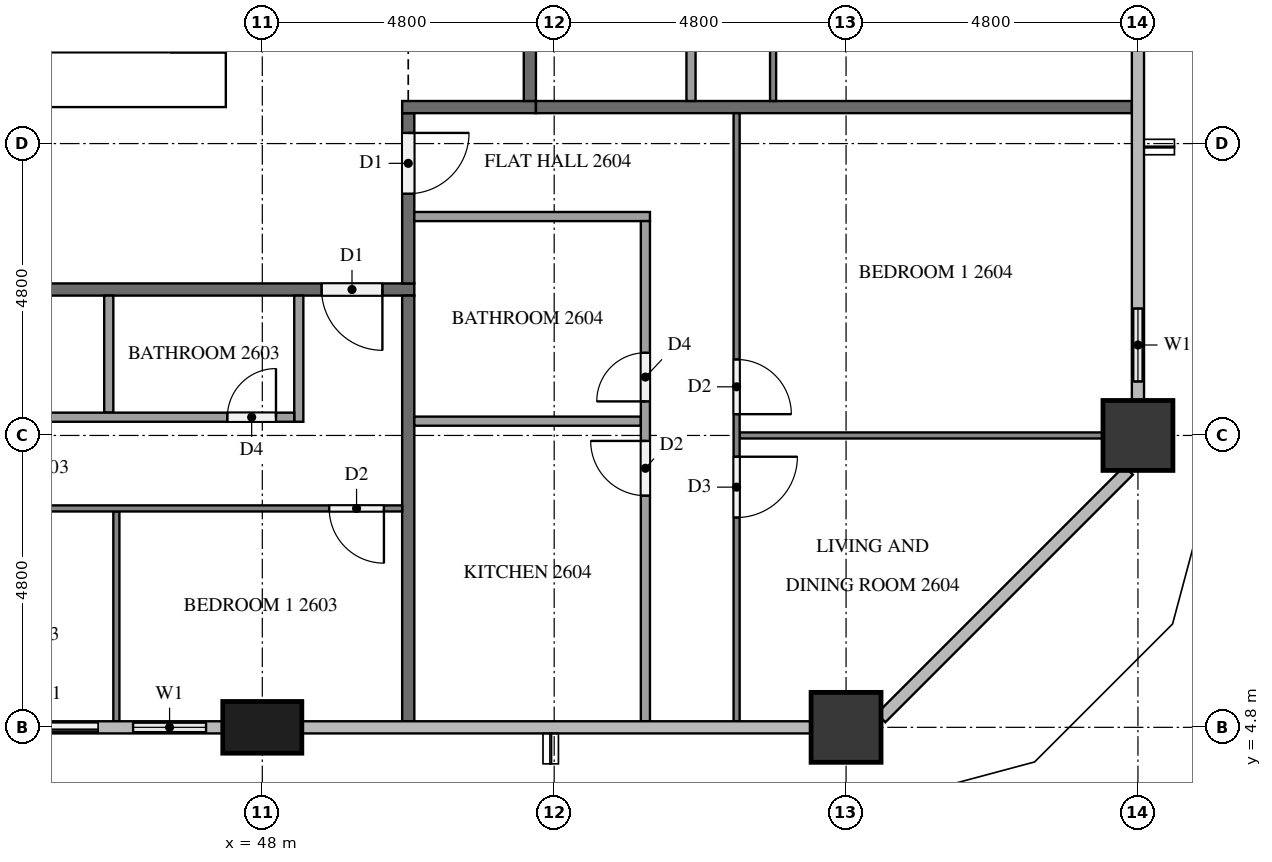
"""IFC4 building model, lengths in metres.
Left out: names, types, materials, properties, quantities, classifications, styles, units other than length and angle.
Written with IfcOpenShell. Run it as: python <this file> out.ifc"""

import sys

from ifc_helpers import new_model, si_unit, direction, frame, frame_2d, origin, origin_2d, place, context, subcontext, project, spatial, rectangle, extrude, element, fill, save


model = new_model("IFC4")
c1 = context("Model", 3, precision=1e-05, world=origin(), true_north=direction((0.0, 1.0)))
c2 = subcontext(c1, "Body", "Model", "MODEL_VIEW")
j1 = project(units=[si_unit("LENGTHUNIT", "METRE"), si_unit("PLANEANGLEUNIT", "RADIAN")], contexts=[c1])
p1 = place(None, origin())
s1 = spatial("IfcSite", under=j1, at=p1, CompositionType="ELEMENT")
p2 = place(p1, origin())
s2 = spatial("IfcBuilding", under=s1, at=p2, CompositionType="ELEMENT")
p3 = place(p2, frame((0.0, 0.0, 103.2)))
s3 = spatial("IfcBuildingStorey", under=s2, at=p3, CompositionType="ELEMENT", Elevation=103.2)
p4 = place(p3, frame((15.0, 15.45, 0.0), z_axis=(0.0, 0.0, 1.0), x_axis=(1.0, 0.0, 0.0)))
e1 = element("IfcWall", 1, at=p4, inside=s3, PredefinedType="SHEAR", context=c2, shape_type="SweptSolid", body=[
    extrude(rectangle(XDim=32.4, YDim=0.9, at=frame_2d((16.2, 0.0))), origin(), (0.0, 0.0, 1.0), 3.2),
])
p5 = place(p4, frame((15.3, 0.0, 0.0)))
e2 = element("IfcOpeningElement", 2, at=p5, cuts=e1, PredefinedType="OPENING", context=c2, shape_type="SweptSolid", body=[
    extrude(rectangle(XDim=1.8, YDim=2.1, at=frame_2d((0.9, 1.05))), frame((0.0, 0.46, 0.0), z_axis=(0.0, -1.0, 0.0), x_axis=(1.0, 0.0, 0.0)), (0.0, 0.0, 1.0), 0.92),
])
p6 = place(p3, frame((48.0, 4.8, 0.0), z_axis=(0.0, 0.0, 1.0), x_axis=(1.0, 0.0, 0.0)))
e3 = element("IfcColumn", 3, at=p6, inside=s3, PredefinedType="COLUMN", context=c2, shape_type="SweptSolid", body=[
    extrude(rectangle(XDim=1.3, YDim=0.85, at=origin_2d()), origin(), (0.0, 0.0, 1.0), 3.2),
])
for number, where, z_axis, x_axis in (
    (4, (57.6, 4.8, 0.0), (0.0, 0.0, 1.0), (1.0, 0.0, 0.0)),
    (5, (62.4, 9.6, 0.0), (0.0, 0.0, 1.0), (1.0, 0.0, 0.0)),
):
    element("IfcColumn", number, at=place(p3, frame(where, z_axis=z_axis, x_axis=x_axis)), inside=s3, PredefinedType="COLUMN", context=c2, shape_type="SweptSolid", body=[
        extrude(rectangle(XDim=1.15, YDim=1.15, at=origin_2d()), origin(), (0.0, 0.0, 1.0), 3.2),
    ])
p7 = place(p3, frame((43.2, 4.8, 0.0), z_axis=(0.0, 0.0, 1.0), x_axis=(1.0, 0.0, 0.0)))
e6 = element("IfcWall", 6, at=p7, inside=s3, PredefinedType="SOLIDWALL", context=c2, shape_type="SweptSolid", body=[
    extrude(rectangle(XDim=4.15, YDim=0.15, at=frame_2d((2.075, 0.0))), origin(), (0.0, 0.0, 1.0), 3.2),
])
p8 = place(p7, frame((0.3, 0.0, 0.0)))
e7 = element("IfcOpeningElement", 7, at=p8, cuts=e6, PredefinedType="OPENING", context=c2, shape_type="SweptSolid", body=[
    extrude(rectangle(XDim=1.8, YDim=2.4, at=frame_2d((0.9, 1.2))), frame((0.0, 0.085, 0.0), z_axis=(0.0, -1.0, 0.0), x_axis=(1.0, 0.0, 0.0)), (0.0, 0.0, 1.0), 0.17),
])
p9 = place(p7, frame((2.675, 0.0, 0.9)))
e8 = element("IfcOpeningElement", 8, at=p9, cuts=e6, PredefinedType="OPENING", context=c2, shape_type="SweptSolid", body=[
    extrude(rectangle(XDim=1.2, YDim=1.4, at=frame_2d((0.6, 0.7))), frame((0.0, 0.085, 0.0), z_axis=(0.0, -1.0, 0.0), x_axis=(1.0, 0.0, 0.0)), (0.0, 0.0, 1.0), 0.17),
])
p10 = place(p3, frame((62.4, 10.175, 0.0), z_axis=(0.0, 0.0, 1.0), x_axis=(0.0, 1.0, 0.0)))
e9 = element("IfcWall", 9, at=p10, inside=s3, PredefinedType="SOLIDWALL", context=c2, shape_type="SweptSolid", body=[
    extrude(rectangle(XDim=1.825, YDim=0.15, at=frame_2d((0.913, 0.0))), origin(), (0.0, 0.0, 1.0), 3.2),
])
p11 = place(p10, frame((0.312, 0.0, 0.9)))
e10 = element("IfcOpeningElement", 10, at=p11, cuts=e9, PredefinedType="OPENING", context=c2, shape_type="SweptSolid", body=[
    extrude(rectangle(XDim=1.2, YDim=1.4, at=frame_2d((0.6, 0.7))), frame((0.0, 0.085, 0.0), z_axis=(0.0, -1.0, 0.0), x_axis=(1.0, 0.0, 0.0)), (0.0, 0.0, 1.0), 0.17),
])
p12 = place(p3, frame((50.5, 12.0, 0.0), z_axis=(0.0, 0.0, 1.0), x_axis=(-1.0, 0.0, 0.0)))
e11 = element("IfcWall", 11, at=p12, inside=s3, PredefinedType="PARTITIONING", context=c2, shape_type="SweptSolid", body=[
    extrude(rectangle(XDim=38.6, YDim=0.2, at=frame_2d((19.3, 0.0))), origin(), (0.0, 0.0, 1.0), 3.2),
])
p13 = place(p12, frame((37.075, 0.0, 0.0)))
e12 = element("IfcOpeningElement", 12, at=p13, cuts=e11, PredefinedType="OPENING", context=c2, shape_type="SweptSolid", body=[
    extrude(rectangle(XDim=1.0, YDim=2.1, at=frame_2d((0.5, 1.05))), frame((0.0, 0.11, 0.0), z_axis=(0.0, -1.0, 0.0), x_axis=(1.0, 0.0, 0.0)), (0.0, 0.0, 1.0), 0.22),
])
p14 = place(p12, frame((22.675, 0.0, 0.0)))
e13 = element("IfcOpeningElement", 13, at=p14, cuts=e11, PredefinedType="OPENING", context=c2, shape_type="SweptSolid", body=[
    extrude(rectangle(XDim=1.0, YDim=2.1, at=frame_2d((0.5, 1.05))), frame((0.0, 0.11, 0.0), z_axis=(0.0, -1.0, 0.0), x_axis=(1.0, 0.0, 0.0)), (0.0, 0.0, 1.0), 0.22),
])
p15 = place(p12, frame((0.525, 0.0, 0.0)))
e14 = element("IfcOpeningElement", 14, at=p15, cuts=e11, PredefinedType="OPENING", context=c2, shape_type="SweptSolid", body=[
    extrude(rectangle(XDim=1.0, YDim=2.1, at=frame_2d((0.5, 1.05))), frame((0.0, 0.11, 0.0), z_axis=(0.0, -1.0, 0.0), x_axis=(1.0, 0.0, 0.0)), (0.0, 0.0, 1.0), 0.22),
])
p16 = place(p3, frame((50.4, 14.9, 0.0), z_axis=(0.0, 0.0, 1.0), x_axis=(0.0, -1.0, 0.0)))
e15 = element("IfcWall", 15, at=p16, inside=s3, PredefinedType="PARTITIONING", context=c2, shape_type="SweptSolid", body=[
    extrude(rectangle(XDim=2.8, YDim=0.2, at=frame_2d((1.4, 0.0))), origin(), (0.0, 0.0, 1.0), 3.2),
])
p17 = place(p16, frame((0.325, 0.0, 0.0)))
e16 = element("IfcOpeningElement", 16, at=p17, cuts=e15, PredefinedType="OPENING", context=c2, shape_type="SweptSolid", body=[
    extrude(rectangle(XDim=1.0, YDim=2.1, at=frame_2d((0.5, 1.05))), frame((0.0, 0.11, 0.0), z_axis=(0.0, -1.0, 0.0), x_axis=(1.0, 0.0, 0.0)), (0.0, 0.0, 1.0), 0.22),
])
p18 = place(p3, frame((50.3, 15.0, 0.0), z_axis=(0.0, 0.0, 1.0), x_axis=(1.0, 0.0, 0.0)))
e17 = element("IfcWall", 17, at=p18, inside=s3, PredefinedType="PARTITIONING", context=c2, shape_type="SweptSolid", body=[
    extrude(rectangle(XDim=2.2, YDim=0.2, at=frame_2d((1.1, 0.0))), origin(), (0.0, 0.0, 1.0), 3.2),
])
p19 = place(p3, frame((52.4, 37.7, 0.0), z_axis=(0.0, 0.0, 1.0), x_axis=(0.0, -1.0, 0.0)))
e18 = element("IfcWall", 18, at=p19, inside=s3, PredefinedType="PARTITIONING", context=c2, shape_type="SweptSolid", body=[
    extrude(rectangle(XDim=22.6, YDim=0.2, at=frame_2d((11.3, 0.0))), origin(), (0.0, 0.0, 1.0), 3.2),
])
p20 = place(p19, frame((6.925, 0.0, 0.0)))
e19 = element("IfcOpeningElement", 19, at=p20, cuts=e18, PredefinedType="OPENING", context=c2, shape_type="SweptSolid", body=[
    extrude(rectangle(XDim=1.0, YDim=2.1, at=frame_2d((0.5, 1.05))), frame((0.0, 0.11, 0.0), z_axis=(0.0, -1.0, 0.0), x_axis=(1.0, 0.0, 0.0)), (0.0, 0.0, 1.0), 0.22),
])
p21 = place(p19, frame((5.075, 0.0, 0.0)))
e20 = element("IfcOpeningElement", 20, at=p21, cuts=e18, PredefinedType="OPENING", context=c2, shape_type="SweptSolid", body=[
    extrude(rectangle(XDim=1.0, YDim=2.1, at=frame_2d((0.5, 1.05))), frame((0.0, 0.11, 0.0), z_axis=(0.0, -1.0, 0.0), x_axis=(1.0, 0.0, 0.0)), (0.0, 0.0, 1.0), 0.22),
])
p22 = place(p3, frame((50.4, 11.9, 0.0), z_axis=(0.0, 0.0, 1.0), x_axis=(0.0, -1.0, 0.0)))
e21 = element("IfcWall", 21, at=p22, inside=s3, PredefinedType="PARTITIONING", context=c2, shape_type="SweptSolid", body=[
    extrude(rectangle(XDim=7.0, YDim=0.2, at=frame_2d((3.5, 0.0))), origin(), (0.0, 0.0, 1.0), 3.2),
])
p23 = place(p3, frame((52.5, 15.0, 0.0), z_axis=(0.0, 0.0, 1.0), x_axis=(1.0, 0.0, 0.0)))
e22 = element("IfcWall", 22, at=p23, inside=s3, PredefinedType="PARTITIONING", context=c2, shape_type="SweptSolid", body=[
    extrude(rectangle(XDim=9.8, YDim=0.2, at=frame_2d((4.9, 0.0))), origin(), (0.0, 0.0, 1.0), 3.2),
])
p24 = place(p3, frame((45.6, 8.35, 0.0), z_axis=(0.0, 0.0, 1.0), x_axis=(0.0, -1.0, 0.0)))
e23 = element("IfcWall", 23, at=p24, inside=s3, PredefinedType="PARTITIONING", context=c2, shape_type="SweptSolid", body=[
    extrude(rectangle(XDim=3.45, YDim=0.1, at=frame_2d((1.725, 0.0))), origin(), (0.0, 0.0, 1.0), 3.2),
])
p25 = place(p3, frame((50.3, 8.4, 0.0), z_axis=(0.0, 0.0, 1.0), x_axis=(-1.0, 0.0, 0.0)))
e24 = element("IfcWall", 24, at=p25, inside=s3, PredefinedType="PARTITIONING", context=c2, shape_type="SweptSolid", body=[
    extrude(rectangle(XDim=9.4, YDim=0.1, at=frame_2d((4.7, 0.0))), origin(), (0.0, 0.0, 1.0), 3.2),
])
p26 = place(p25, frame((0.3, 0.0, 0.0)))
e25 = element("IfcOpeningElement", 25, at=p26, cuts=e24, PredefinedType="OPENING", context=c2, shape_type="SweptSolid", body=[
    extrude(rectangle(XDim=0.9, YDim=2.1, at=frame_2d((0.45, 1.05))), frame((0.0, 0.06, 0.0), z_axis=(0.0, -1.0, 0.0), x_axis=(1.0, 0.0, 0.0)), (0.0, 0.0, 1.0), 0.12),
])
p27 = place(p25, frame((8.1, 0.0, 0.0)))
e26 = element("IfcOpeningElement", 26, at=p27, cuts=e24, PredefinedType="OPENING", context=c2, shape_type="SweptSolid", body=[
    extrude(rectangle(XDim=1.0, YDim=2.1, at=frame_2d((0.5, 1.05))), frame((0.0, 0.06, 0.0), z_axis=(0.0, -1.0, 0.0), x_axis=(1.0, 0.0, 0.0)), (0.0, 0.0, 1.0), 0.12),
])
p28 = place(p3, frame((45.475, 11.9, 0.0), z_axis=(0.0, 0.0, 1.0), x_axis=(0.0, -1.0, 0.0)))
e27 = element("IfcWall", 27, at=p28, inside=s3, PredefinedType="PARTITIONING", context=c2, shape_type="SweptSolid", body=[
    extrude(rectangle(XDim=1.925, YDim=0.15, at=frame_2d((0.962, 0.0))), origin(), (0.0, 0.0, 1.0), 3.2),
])
p29 = place(p3, frame((48.6, 11.9, 0.0), z_axis=(0.0, 0.0, 1.0), x_axis=(0.0, -1.0, 0.0)))
e28 = element("IfcWall", 28, at=p29, inside=s3, PredefinedType="PARTITIONING", context=c2, shape_type="SweptSolid", body=[
    extrude(rectangle(XDim=2.075, YDim=0.15, at=frame_2d((1.038, 0.0))), origin(), (0.0, 0.0, 1.0), 3.2),
])
p30 = place(p3, frame((40.9, 9.9, 0.0), z_axis=(0.0, 0.0, 1.0), x_axis=(1.0, 0.0, 0.0)))
e29 = element("IfcWall", 29, at=p30, inside=s3, PredefinedType="PARTITIONING", context=c2, shape_type="SweptSolid", body=[
    extrude(rectangle(XDim=7.625, YDim=0.15, at=frame_2d((3.812, 0.0))), origin(), (0.0, 0.0, 1.0), 3.2),
])
p31 = place(p30, frame((6.525, 0.0, 0.0)))
e30 = element("IfcOpeningElement", 30, at=p31, cuts=e29, PredefinedType="OPENING", context=c2, shape_type="SweptSolid", body=[
    extrude(rectangle(XDim=0.8, YDim=2.1, at=frame_2d((0.4, 1.05))), frame((0.0, 0.085, 0.0), z_axis=(0.0, -1.0, 0.0), x_axis=(1.0, 0.0, 0.0)), (0.0, 0.0, 1.0), 0.17),
])
p32 = place(p30, frame((0.35, 0.0, 0.0)))
e31 = element("IfcOpeningElement", 31, at=p32, cuts=e29, PredefinedType="OPENING", context=c2, shape_type="SweptSolid", body=[
    extrude(rectangle(XDim=0.9, YDim=2.1, at=frame_2d((0.45, 1.05))), frame((0.0, 0.085, 0.0), z_axis=(0.0, -1.0, 0.0), x_axis=(1.0, 0.0, 0.0)), (0.0, 0.0, 1.0), 0.17),
])
p33 = place(p3, frame((55.85, 9.6, 0.0), z_axis=(0.0, 0.0, 1.0), x_axis=(1.0, 0.0, 0.0)))
e32 = element("IfcWall", 32, at=p33, inside=s3, PredefinedType="PARTITIONING", context=c2, shape_type="SweptSolid", body=[
    extrude(rectangle(XDim=5.975, YDim=0.1, at=frame_2d((2.987, 0.0))), origin(), (0.0, 0.0, 1.0), 3.2),
])
p34 = place(p3, frame((55.8, 14.9, 0.0), z_axis=(0.0, 0.0, 1.0), x_axis=(0.0, -1.0, 0.0)))
e33 = element("IfcWall", 33, at=p34, inside=s3, PredefinedType="PARTITIONING", context=c2, shape_type="SweptSolid", body=[
    extrude(rectangle(XDim=10.0, YDim=0.1, at=frame_2d((5.0, 0.0))), origin(), (0.0, 0.0, 1.0), 3.2),
])
p35 = place(p34, frame((4.05, 0.0, 0.0)))
e34 = element("IfcOpeningElement", 34, at=p35, cuts=e33, PredefinedType="OPENING", context=c2, shape_type="SweptSolid", body=[
    extrude(rectangle(XDim=0.9, YDim=2.1, at=frame_2d((0.45, 1.05))), frame((0.0, 0.06, 0.0), z_axis=(0.0, -1.0, 0.0), x_axis=(1.0, 0.0, 0.0)), (0.0, 0.0, 1.0), 0.12),
])
p36 = place(p34, frame((5.65, 0.0, 0.0)))
e35 = element("IfcOpeningElement", 35, at=p36, cuts=e33, PredefinedType="OPENING", context=c2, shape_type="SweptSolid", body=[
    extrude(rectangle(XDim=1.0, YDim=2.1, at=frame_2d((0.5, 1.05))), frame((0.0, 0.06, 0.0), z_axis=(0.0, -1.0, 0.0), x_axis=(1.0, 0.0, 0.0)), (0.0, 0.0, 1.0), 0.12),
])
p37 = place(p3, frame((50.5, 9.835, 0.0), z_axis=(0.0, 0.0, 1.0), x_axis=(1.0, 0.0, 0.0)))
e36 = element("IfcWall", 36, at=p37, inside=s3, PredefinedType="PARTITIONING", context=c2, shape_type="SweptSolid", body=[
    extrude(rectangle(XDim=3.725, YDim=0.15, at=frame_2d((1.863, 0.0))), origin(), (0.0, 0.0, 1.0), 3.2),
])
p38 = place(p3, frame((50.5, 13.2, 0.0), z_axis=(0.0, 0.0, 1.0), x_axis=(1.0, 0.0, 0.0)))
e37 = element("IfcWall", 37, at=p38, inside=s3, PredefinedType="PARTITIONING", context=c2, shape_type="SweptSolid", body=[
    extrude(rectangle(XDim=3.875, YDim=0.15, at=frame_2d((1.938, 0.0))), origin(), (0.0, 0.0, 1.0), 3.2),
])
p39 = place(p3, frame((54.3, 4.9, 0.0), z_axis=(0.0, 0.0, 1.0), x_axis=(0.0, 1.0, 0.0)))
e38 = element("IfcWall", 38, at=p39, inside=s3, PredefinedType="PARTITIONING", context=c2, shape_type="SweptSolid", body=[
    extrude(rectangle(XDim=8.225, YDim=0.15, at=frame_2d((4.113, 0.0))), origin(), (0.0, 0.0, 1.0), 3.2),
])
p40 = place(p39, frame((5.26, 0.0, 0.0)))
e39 = element("IfcOpeningElement", 39, at=p40, cuts=e38, PredefinedType="OPENING", context=c2, shape_type="SweptSolid", body=[
    extrude(rectangle(XDim=0.8, YDim=2.1, at=frame_2d((0.4, 1.05))), frame((0.0, 0.085, 0.0), z_axis=(0.0, -1.0, 0.0), x_axis=(1.0, 0.0, 0.0)), (0.0, 0.0, 1.0), 0.17),
])
p41 = place(p39, frame((3.71, 0.0, 0.0)))
e40 = element("IfcOpeningElement", 40, at=p41, cuts=e38, PredefinedType="OPENING", context=c2, shape_type="SweptSolid", body=[
    extrude(rectangle(XDim=0.9, YDim=2.1, at=frame_2d((0.45, 1.05))), frame((0.0, 0.085, 0.0), z_axis=(0.0, -1.0, 0.0), x_axis=(1.0, 0.0, 0.0)), (0.0, 0.0, 1.0), 0.17),
])
p42 = place(p3, frame((56.4, 31.1, 0.0), z_axis=(0.0, 0.0, 1.0), x_axis=(0.0, -1.0, 0.0)))
e41 = element("IfcWall", 41, at=p42, inside=s3, PredefinedType="PARTITIONING", context=c2, shape_type="SweptSolid", body=[
    extrude(rectangle(XDim=16.0, YDim=0.1, at=frame_2d((8.0, 0.0))), origin(), (0.0, 0.0, 1.0), 3.2),
])
p43 = place(p42, frame((0.3, 0.0, 0.0)))
e42 = element("IfcOpeningElement", 42, at=p43, cuts=e41, PredefinedType="OPENING", context=c2, shape_type="SweptSolid", body=[
    extrude(rectangle(XDim=0.9, YDim=2.1, at=frame_2d((0.45, 1.05))), frame((0.0, 0.06, 0.0), z_axis=(0.0, -1.0, 0.0), x_axis=(1.0, 0.0, 0.0)), (0.0, 0.0, 1.0), 0.12),
])
p44 = place(p42, frame((8.25, 0.0, 0.0)))
e43 = element("IfcOpeningElement", 43, at=p44, cuts=e41, PredefinedType="OPENING", context=c2, shape_type="SweptSolid", body=[
    extrude(rectangle(XDim=0.9, YDim=2.1, at=frame_2d((0.45, 1.05))), frame((0.0, 0.06, 0.0), z_axis=(0.0, -1.0, 0.0), x_axis=(1.0, 0.0, 0.0)), (0.0, 0.0, 1.0), 0.12),
])
p45 = place(p42, frame((9.85, 0.0, 0.0)))
e44 = element("IfcOpeningElement", 44, at=p45, cuts=e41, PredefinedType="OPENING", context=c2, shape_type="SweptSolid", body=[
    extrude(rectangle(XDim=1.0, YDim=2.1, at=frame_2d((0.5, 1.05))), frame((0.0, 0.06, 0.0), z_axis=(0.0, -1.0, 0.0), x_axis=(1.0, 0.0, 0.0)), (0.0, 0.0, 1.0), 0.12),
])
p46 = place(p3, frame((55.05, 15.1, 0.0), z_axis=(0.0, 0.0, 1.0), x_axis=(0.0, 1.0, 0.0)))
e45 = element("IfcWall", 45, at=p46, inside=s3, PredefinedType="PARTITIONING", context=c2, shape_type="SweptSolid", body=[
    extrude(rectangle(XDim=14.225, YDim=0.15, at=frame_2d((7.112, 0.0))), origin(), (0.0, 0.0, 1.0), 3.2),
])
p47 = place(p46, frame((13.125, 0.0, 0.0)))
e46 = element("IfcOpeningElement", 46, at=p47, cuts=e45, PredefinedType="OPENING", context=c2, shape_type="SweptSolid", body=[
    extrude(rectangle(XDim=0.8, YDim=2.1, at=frame_2d((0.4, 1.05))), frame((0.0, 0.085, 0.0), z_axis=(0.0, -1.0, 0.0), x_axis=(1.0, 0.0, 0.0)), (0.0, 0.0, 1.0), 0.17),
])
p48 = place(p46, frame((4.702, 0.0, 0.0)))
e47 = element("IfcOpeningElement", 47, at=p48, cuts=e45, PredefinedType="OPENING", context=c2, shape_type="SweptSolid", body=[
    extrude(rectangle(XDim=0.9, YDim=2.1, at=frame_2d((0.45, 1.05))), frame((0.0, 0.085, 0.0), z_axis=(0.0, -1.0, 0.0), x_axis=(1.0, 0.0, 0.0)), (0.0, 0.0, 1.0), 0.17),
])
p49 = place(p46, frame((3.152, 0.0, 0.0)))
e48 = element("IfcOpeningElement", 48, at=p49, cuts=e45, PredefinedType="OPENING", context=c2, shape_type="SweptSolid", body=[
    extrude(rectangle(XDim=0.9, YDim=2.1, at=frame_2d((0.45, 1.05))), frame((0.0, 0.085, 0.0), z_axis=(0.0, -1.0, 0.0), x_axis=(1.0, 0.0, 0.0)), (0.0, 0.0, 1.0), 0.17),
])
p50 = place(p8, origin())
e49 = element("IfcDoor", 49, at=p50, inside=s3, OperationType="SLIDING_TO_LEFT", PredefinedType="DOOR", context=c2, shape_type="SweptSolid", body=[
    extrude(rectangle(XDim=1.8, YDim=2.4, at=frame_2d((0.9, 1.2))), frame((0.0, 0.025, 0.0), z_axis=(0.0, -1.0, 0.0), x_axis=(1.0, 0.0, 0.0)), (0.0, 0.0, 1.0), 0.05),
])
fill(e7, e49)
p51 = place(p9, origin())
e50 = element("IfcWindow", 50, at=p51, inside=s3, PartitioningType="SINGLE_PANEL", PredefinedType="WINDOW", context=c2, shape_type="SweptSolid", body=[
    extrude(rectangle(XDim=1.2, YDim=1.4, at=frame_2d((0.6, 0.7))), frame((0.0, 0.03, 0.0), z_axis=(0.0, -1.0, 0.0), x_axis=(1.0, 0.0, 0.0)), (0.0, 0.0, 1.0), 0.06),
])
fill(e8, e50)
p52 = place(p11, origin())
e51 = element("IfcWindow", 51, at=p52, inside=s3, PartitioningType="SINGLE_PANEL", PredefinedType="WINDOW", context=c2, shape_type="SweptSolid", body=[
    extrude(rectangle(XDim=1.2, YDim=1.4, at=frame_2d((0.6, 0.7))), frame((0.0, 0.03, 0.0), z_axis=(0.0, -1.0, 0.0), x_axis=(1.0, 0.0, 0.0)), (0.0, 0.0, 1.0), 0.06),
])
fill(e10, e51)
p53 = place(p15, origin())
e52 = element("IfcDoor", 52, at=p53, inside=s3, OperationType="SINGLE_SWING_LEFT", PredefinedType="DOOR", context=c2, shape_type="SweptSolid", body=[
    extrude(rectangle(XDim=1.0, YDim=2.1, at=frame_2d((0.5, 1.05))), frame((0.0, 0.025, 0.0), z_axis=(0.0, -1.0, 0.0), x_axis=(1.0, 0.0, 0.0)), (0.0, 0.0, 1.0), 0.05),
])
fill(e14, e52)
p54 = place(p17, origin())
e53 = element("IfcDoor", 53, at=p54, inside=s3, OperationType="SINGLE_SWING_LEFT", PredefinedType="DOOR", context=c2, shape_type="SweptSolid", body=[
    extrude(rectangle(XDim=1.0, YDim=2.1, at=frame_2d((0.5, 1.05))), frame((0.0, 0.025, 0.0), z_axis=(0.0, -1.0, 0.0), x_axis=(1.0, 0.0, 0.0)), (0.0, 0.0, 1.0), 0.05),
])
fill(e16, e53)
p55 = place(p26, origin())
e54 = element("IfcDoor", 54, at=p55, inside=s3, OperationType="SINGLE_SWING_LEFT", PredefinedType="DOOR", context=c2, shape_type="SweptSolid", body=[
    extrude(rectangle(XDim=0.9, YDim=2.1, at=frame_2d((0.45, 1.05))), frame((0.0, 0.025, 0.0), z_axis=(0.0, -1.0, 0.0), x_axis=(1.0, 0.0, 0.0)), (0.0, 0.0, 1.0), 0.05),
])
fill(e25, e54)
p56 = place(p31, origin())
e55 = element("IfcDoor", 55, at=p56, inside=s3, OperationType="SINGLE_SWING_RIGHT", PredefinedType="DOOR", context=c2, shape_type="SweptSolid", body=[
    extrude(rectangle(XDim=0.8, YDim=2.1, at=frame_2d((0.4, 1.05))), frame((0.0, 0.025, 0.0), z_axis=(0.0, -1.0, 0.0), x_axis=(1.0, 0.0, 0.0)), (0.0, 0.0, 1.0), 0.05),
])
fill(e30, e55)
p57 = place(p35, origin())
e56 = element("IfcDoor", 56, at=p57, inside=s3, OperationType="SINGLE_SWING_RIGHT", PredefinedType="DOOR", context=c2, shape_type="SweptSolid", body=[
    extrude(rectangle(XDim=0.9, YDim=2.1, at=frame_2d((0.45, 1.05))), frame((0.0, 0.025, 0.0), z_axis=(0.0, -1.0, 0.0), x_axis=(1.0, 0.0, 0.0)), (0.0, 0.0, 1.0), 0.05),
])
fill(e34, e56)
p58 = place(p36, origin())
e57 = element("IfcDoor", 57, at=p58, inside=s3, OperationType="SINGLE_SWING_LEFT", PredefinedType="DOOR", context=c2, shape_type="SweptSolid", body=[
    extrude(rectangle(XDim=1.0, YDim=2.1, at=frame_2d((0.5, 1.05))), frame((0.0, 0.025, 0.0), z_axis=(0.0, -1.0, 0.0), x_axis=(1.0, 0.0, 0.0)), (0.0, 0.0, 1.0), 0.05),
])
fill(e35, e57)
p59 = place(p40, origin())
e58 = element("IfcDoor", 58, at=p59, inside=s3, OperationType="SINGLE_SWING_LEFT", PredefinedType="DOOR", context=c2, shape_type="SweptSolid", body=[
    extrude(rectangle(XDim=0.8, YDim=2.1, at=frame_2d((0.4, 1.05))), frame((0.0, 0.025, 0.0), z_axis=(0.0, -1.0, 0.0), x_axis=(1.0, 0.0, 0.0)), (0.0, 0.0, 1.0), 0.05),
])
fill(e39, e58)
p60 = place(p41, origin())
e59 = element("IfcDoor", 59, at=p60, inside=s3, OperationType="SINGLE_SWING_RIGHT", PredefinedType="DOOR", context=c2, shape_type="SweptSolid", body=[
    extrude(rectangle(XDim=0.9, YDim=2.1, at=frame_2d((0.45, 1.05))), frame((0.0, 0.025, 0.0), z_axis=(0.0, -1.0, 0.0), x_axis=(1.0, 0.0, 0.0)), (0.0, 0.0, 1.0), 0.05),
])
fill(e40, e59)
save(model, sys.argv[1])
